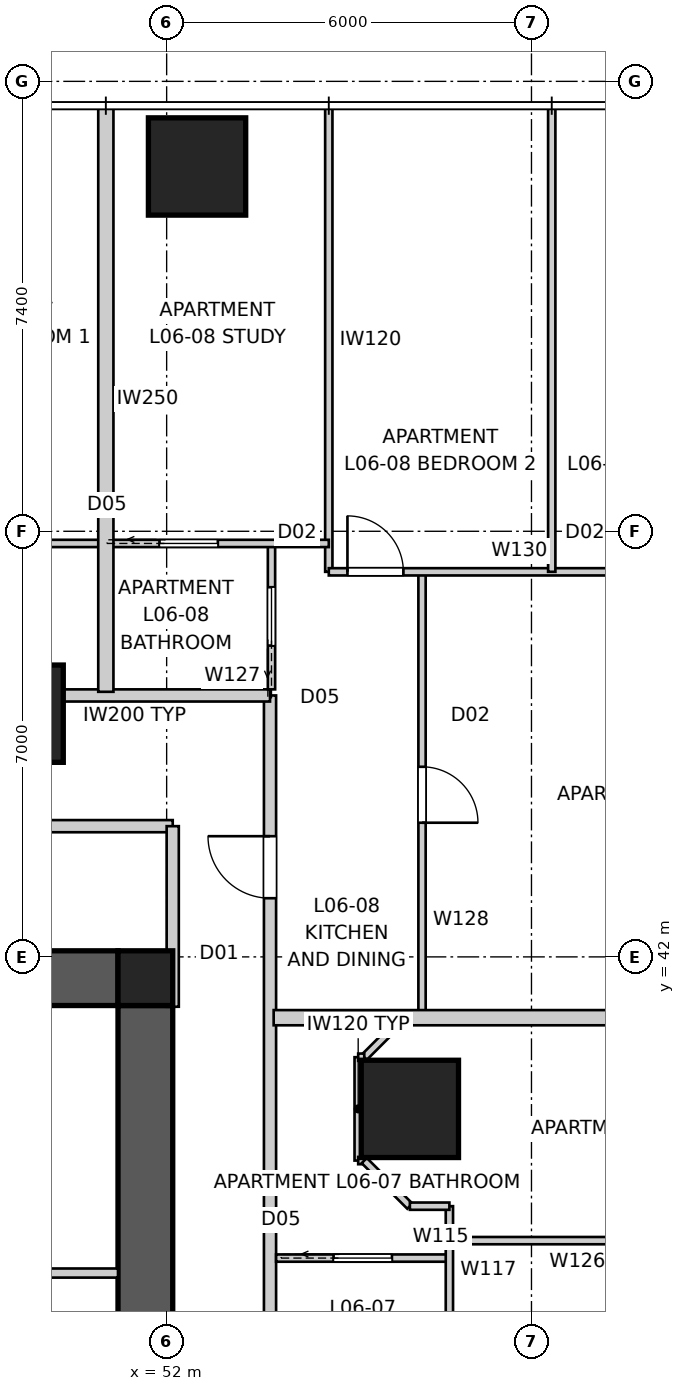
"""IFC4 building model, lengths in metres.
Left out: names, types, materials, properties, quantities, classifications, styles, units other than length and angle.
Written with IfcOpenShell. Run it as: python <this file> out.ifc"""

import sys

from ifc_helpers import new_model, si_unit, direction, frame, frame_2d, origin, origin_2d, place, context, subcontext, project, spatial, polyline, rectangle, outline, extrude, element, fill, save


model = new_model("IFC4")
c1 = context("Model", 3, precision=1e-05, world=origin(), true_north=direction((0.0, 1.0)))
c2 = subcontext(c1, "Body", "Model", "MODEL_VIEW")
j1 = project(units=[si_unit("LENGTHUNIT", "METRE"), si_unit("PLANEANGLEUNIT", "RADIAN")], contexts=[c1])
p1 = place(None, origin())
s1 = spatial("IfcSite", under=j1, at=p1, CompositionType="ELEMENT")
p2 = place(p1, origin())
s2 = spatial("IfcBuilding", under=s1, at=p2, CompositionType="ELEMENT")
p3 = place(p2, frame((0.0, 0.0, 25.2)))
s3 = spatial("IfcBuildingStorey", under=s2, at=p3, CompositionType="ELEMENT", Elevation=25.2)
p4 = place(p3, frame((28.8, 41.65, 0.0), z_axis=(0.0, 0.0, 1.0), x_axis=(1.0, 0.0, 0.0)))
e1 = element("IfcWall", 1, at=p4, inside=s3, PredefinedType="SHEAR", context=c2, shape_type="SweptSolid", body=[
    extrude(outline(polyline([(0.0, -0.45), (22.4, -0.45), (22.4, -0.025), (22.85, -0.025), (22.85, 0.025), (22.4, 0.025), (22.4, 0.45), (0.0, 0.45), (0.0, 0.025), (-0.45, 0.025), (-0.45, -0.025), (0.0, -0.025), (0.0, -0.45)])), origin(), (0.0, 0.0, 1.0), 3.4),
])
p5 = place(p3, frame((51.65, 18.8, 0.0), z_axis=(0.0, 0.0, 1.0), x_axis=(0.0, 1.0, 0.0)))
e2 = element("IfcWall", 2, at=p5, inside=s3, PredefinedType="SHEAR", context=c2, shape_type="SweptSolid", body=[
    extrude(outline(polyline([(0.0, -0.45), (22.4, -0.45), (22.4, -0.025), (22.85, -0.025), (22.85, 0.025), (22.4, 0.025), (22.4, 0.45), (0.0, 0.45), (0.0, 0.025), (-0.45, 0.025), (-0.45, -0.025), (0.0, -0.025), (0.0, -0.45)])), origin(), (0.0, 0.0, 1.0), 3.4),
])
p6 = place(p5, frame((11.14, 0.0, 0.0)))
e3 = element("IfcOpeningElement", 3, at=p6, cuts=e2, PredefinedType="OPENING", context=c2, shape_type="SweptSolid", body=[
    extrude(rectangle(XDim=1.02, YDim=2.4, at=frame_2d((0.51, 1.2))), frame((0.0, 0.46, 0.0), z_axis=(0.0, -1.0, 0.0), x_axis=(1.0, 0.0, 0.0)), (0.0, 0.0, 1.0), 0.92),
])
p7 = place(p3, frame((51.65, 41.65, 0.0), z_axis=(0.0, 0.0, 1.0), x_axis=(1.0, 0.0, 0.0)))
e4 = element("IfcColumn", 4, at=p7, inside=s3, PredefinedType="COLUMN", context=c2, shape_type="SweptSolid", body=[
    extrude(rectangle(XDim=0.9, YDim=0.9, at=origin_2d()), origin(), (0.0, 0.0, 1.0), 3.4),
])
for number, where, z_axis, x_axis in (
    (5, (52.5, 55.0, 0.0), (0.0, 0.0, 1.0), (1.0, 0.0, 0.0)),
    (6, (56.0, 39.5, 0.0), (0.0, 0.0, 1.0), (1.0, 0.0, 0.0)),
    (7, (49.5, 46.0, 0.0), (0.0, 0.0, 1.0), (1.0, 0.0, 0.0)),
):
    element("IfcColumn", number, at=place(p3, frame(where, z_axis=z_axis, x_axis=x_axis)), inside=s3, PredefinedType="COLUMN", context=c2, shape_type="SweptSolid", body=[
        extrude(rectangle(XDim=1.6, YDim=1.6, at=origin_2d()), origin(), (0.0, 0.0, 1.0), 3.4),
    ])
p8 = place(p3, frame((53.7, 13.7, 0.0), z_axis=(0.0, 0.0, 1.0), x_axis=(0.0, 1.0, 0.0)))
e8 = element("IfcWall", 8, at=p8, inside=s3, PredefinedType="PARTITIONING", context=c2, shape_type="SweptSolid", body=[
    extrude(rectangle(XDim=32.6, YDim=0.2, at=frame_2d((16.3, 0.0))), origin(), (0.0, 0.0, 1.0), 3.25),
])
p9 = place(p8, frame((2.315, 0.0, 0.0)))
e9 = element("IfcOpeningElement", 9, at=p9, cuts=e8, PredefinedType="OPENING", context=c2, shape_type="SweptSolid", body=[
    extrude(rectangle(XDim=1.02, YDim=2.34, at=frame_2d((0.51, 1.17))), frame((0.0, 0.11, 0.0), z_axis=(0.0, -1.0, 0.0), x_axis=(1.0, 0.0, 0.0)), (0.0, 0.0, 1.0), 0.22),
])
p10 = place(p8, frame((29.265, 0.0, 0.0)))
e10 = element("IfcOpeningElement", 10, at=p10, cuts=e8, PredefinedType="OPENING", context=c2, shape_type="SweptSolid", body=[
    extrude(rectangle(XDim=1.02, YDim=2.34, at=frame_2d((0.51, 1.17))), frame((0.0, 0.11, 0.0), z_axis=(0.0, -1.0, 0.0), x_axis=(1.0, 0.0, 0.0)), (0.0, 0.0, 1.0), 0.22),
])
p11 = place(p8, frame((20.646, 0.0, 0.0)))
e11 = element("IfcOpeningElement", 11, at=p11, cuts=e8, PredefinedType="OPENING", context=c2, shape_type="SweptSolid", body=[
    extrude(rectangle(XDim=1.02, YDim=2.34, at=frame_2d((0.51, 1.17))), frame((0.0, 0.11, 0.0), z_axis=(0.0, -1.0, 0.0), x_axis=(1.0, 0.0, 0.0)), (0.0, 0.0, 1.0), 0.22),
])
p12 = place(p8, frame((13.626, 0.0, 0.0)))
e12 = element("IfcOpeningElement", 12, at=p12, cuts=e8, PredefinedType="OPENING", context=c2, shape_type="SweptSolid", body=[
    extrude(rectangle(XDim=1.02, YDim=2.34, at=frame_2d((0.51, 1.17))), frame((0.0, 0.11, 0.0), z_axis=(0.0, -1.0, 0.0), x_axis=(1.0, 0.0, 0.0)), (0.0, 0.0, 1.0), 0.22),
])
p13 = place(p3, frame((53.7, 46.3, 0.0), z_axis=(0.0, 0.0, 1.0), x_axis=(-1.0, 0.0, 0.0)))
e13 = element("IfcWall", 13, at=p13, inside=s3, PredefinedType="PARTITIONING", context=c2, shape_type="SweptSolid", body=[
    extrude(rectangle(XDim=4.458, YDim=0.2, at=frame_2d((2.229, 0.0))), origin(), (0.0, 0.0, 1.0), 3.25),
])
p14 = place(p3, frame((66.0, 41.0, 0.0), z_axis=(0.0, 0.0, 1.0), x_axis=(-1.0, 0.0, 0.0)))
e14 = element("IfcWall", 14, at=p14, inside=s3, PredefinedType="PARTITIONING", context=c2, shape_type="SweptSolid", body=[
    extrude(rectangle(XDim=12.24, YDim=0.25, at=frame_2d((6.12, 0.0))), origin(), (0.0, 0.0, 1.0), 3.25),
])
p15 = place(p3, frame((51.0, 56.0, 0.0), z_axis=(0.0, 0.0, 1.0), x_axis=(0.0, -1.0, 0.0)))
e15 = element("IfcWall", 15, at=p15, inside=s3, PredefinedType="PARTITIONING", context=c2, shape_type="SweptSolid", body=[
    extrude(rectangle(XDim=9.64, YDim=0.25, at=frame_2d((4.82, 0.0))), origin(), (0.0, 0.0, 1.0), 3.25),
])
p16 = place(p3, frame((43.0, 36.8, 0.0), z_axis=(0.0, 0.0, 1.0), x_axis=(1.0, 0.0, 0.0)))
e16 = element("IfcWall", 16, at=p16, inside=s3, PredefinedType="SOLIDWALL", context=c2, shape_type="SweptSolid", body=[
    extrude(rectangle(XDim=8.2, YDim=0.15, at=frame_2d((4.1, 0.0))), origin(), (0.0, 0.0, 1.0), 3.25),
])
p17 = place(p16, frame((3.64, 0.0, 0.0)))
e17 = element("IfcOpeningElement", 17, at=p17, cuts=e16, PredefinedType="OPENING", context=c2, shape_type="SweptSolid", body=[
    extrude(rectangle(XDim=0.92, YDim=2.1, at=frame_2d((0.46, 1.05))), frame((0.0, 0.085, 0.0), z_axis=(0.0, -1.0, 0.0), x_axis=(1.0, 0.0, 0.0)), (0.0, 0.0, 1.0), 0.17),
])
p18 = place(p3, frame((52.1, 44.15, 0.0), z_axis=(0.0, 0.0, 1.0), x_axis=(-1.0, 0.0, 0.0)))
e18 = element("IfcWall", 18, at=p18, inside=s3, PredefinedType="PARTITIONING", context=c2, shape_type="SweptSolid", body=[
    extrude(rectangle(XDim=24.2, YDim=0.2, at=frame_2d((12.1, 0.0))), origin(), (0.0, 0.0, 1.0), 3.25),
])
p19 = place(p18, frame((10.743, 0.0, 0.0)))
e19 = element("IfcOpeningElement", 19, at=p19, cuts=e18, PredefinedType="OPENING", context=c2, shape_type="SweptSolid", body=[
    extrude(rectangle(XDim=1.02, YDim=2.1, at=frame_2d((0.51, 1.05))), frame((0.0, 0.11, 0.0), z_axis=(0.0, -1.0, 0.0), x_axis=(1.0, 0.0, 0.0)), (0.0, 0.0, 1.0), 0.22),
])
p20 = place(p18, frame((19.636, 0.0, 0.0)))
e20 = element("IfcOpeningElement", 20, at=p20, cuts=e18, PredefinedType="OPENING", context=c2, shape_type="SweptSolid", body=[
    extrude(rectangle(XDim=1.02, YDim=2.1, at=frame_2d((0.51, 1.05))), frame((0.0, 0.11, 0.0), z_axis=(0.0, -1.0, 0.0), x_axis=(1.0, 0.0, 0.0)), (0.0, 0.0, 1.0), 0.22),
])
p21 = place(p18, frame((3.447, 0.0, 0.0)))
e21 = element("IfcOpeningElement", 21, at=p21, cuts=e18, PredefinedType="OPENING", context=c2, shape_type="SweptSolid", body=[
    extrude(rectangle(XDim=1.02, YDim=2.1, at=frame_2d((0.51, 1.05))), frame((0.0, 0.11, 0.0), z_axis=(0.0, -1.0, 0.0), x_axis=(1.0, 0.0, 0.0)), (0.0, 0.0, 1.0), 0.22),
])
p22 = place(p3, frame((52.1, 41.18, 0.0), z_axis=(0.0, 0.0, 1.0), x_axis=(0.0, 1.0, 0.0)))
e22 = element("IfcWall", 22, at=p22, inside=s3, PredefinedType="PARTITIONING", context=c2, shape_type="SweptSolid", body=[
    extrude(rectangle(XDim=2.97, YDim=0.2, at=frame_2d((1.485, 0.0))), origin(), (0.0, 0.0, 1.0), 3.25),
])
p23 = place(p3, frame((53.8, 37.046, 0.0), z_axis=(0.0, 0.0, 1.0), x_axis=(1.0, 0.0, 0.0)))
e23 = element("IfcWall", 23, at=p23, inside=s3, PredefinedType="PARTITIONING", context=c2, shape_type="SweptSolid", body=[
    extrude(rectangle(XDim=2.85, YDim=0.12, at=frame_2d((1.425, 0.0))), origin(), (0.0, 0.0, 1.0), 3.25),
])
p24 = place(p23, frame((0.945, 0.0, 0.0)))
e24 = element("IfcOpeningElement", 24, at=p24, cuts=e23, PredefinedType="OPENING", context=c2, shape_type="SweptSolid", body=[
    extrude(rectangle(XDim=0.96, YDim=2.1, at=frame_2d((0.48, 1.05))), frame((0.0, 0.07, 0.0), z_axis=(0.0, -1.0, 0.0), x_axis=(1.0, 0.0, 0.0)), (0.0, 0.0, 1.0), 0.14),
])
p25 = place(p3, frame((56.65, 37.9, 0.0), z_axis=(0.0, 0.0, 1.0), x_axis=(0.0, -1.0, 0.0)))
e25 = element("IfcWall", 25, at=p25, inside=s3, PredefinedType="PARTITIONING", context=c2, shape_type="SweptSolid", body=[
    extrude(rectangle(XDim=5.234, YDim=0.12, at=frame_2d((2.617, 0.0))), origin(), (0.0, 0.0, 1.0), 2.55),
])
p26 = place(p25, frame((2.109, 0.0, 0.0)))
e26 = element("IfcOpeningElement", 26, at=p26, cuts=e25, PredefinedType="OPENING", context=c2, shape_type="SweptSolid", body=[
    extrude(rectangle(XDim=0.92, YDim=2.34, at=frame_2d((0.46, 1.17))), frame((0.0, 0.07, 0.0), z_axis=(0.0, -1.0, 0.0), x_axis=(1.0, 0.0, 0.0)), (0.0, 0.0, 1.0), 0.14),
])
p27 = place(p3, frame((55.9, 41.0, 0.0), z_axis=(0.0, 0.0, 1.0), x_axis=(-0.707106781187, -0.707106781187, 0.0)))
e27 = element("IfcWall", 27, at=p27, inside=s3, PredefinedType="PARTITIONING", context=c2, shape_type="SweptSolid", body=[
    extrude(rectangle(XDim=0.919, YDim=0.12, at=frame_2d((0.459, 0.0))), origin(), (0.0, 0.0, 1.0), 3.25),
])
p28 = place(p3, frame((55.15, 40.35, 0.0), z_axis=(0.0, 0.0, 1.0), x_axis=(0.0, -1.0, 0.0)))
e28 = element("IfcWall", 28, at=p28, inside=s3, PredefinedType="PARTITIONING", context=c2, shape_type="SweptSolid", body=[
    extrude(rectangle(XDim=1.7, YDim=0.12, at=frame_2d((0.85, 0.0))), origin(), (0.0, 0.0, 1.0), 3.25),
])
p29 = place(p3, frame((55.25, 38.65, 0.0), z_axis=(0.0, 0.0, 1.0), x_axis=(0.707106781187, -0.707106781187, 0.0)))
e29 = element("IfcWall", 29, at=p29, inside=s3, PredefinedType="PARTITIONING", context=c2, shape_type="SweptSolid", body=[
    extrude(rectangle(XDim=1.061, YDim=0.12, at=frame_2d((0.53, 0.0))), origin(), (0.0, 0.0, 1.0), 3.25),
])
p30 = place(p3, frame((56.0, 37.9, 0.0), z_axis=(0.0, 0.0, 1.0), x_axis=(1.0, 0.0, 0.0)))
e30 = element("IfcWall", 30, at=p30, inside=s3, PredefinedType="PARTITIONING", context=c2, shape_type="SweptSolid", body=[
    extrude(rectangle(XDim=0.65, YDim=0.12, at=frame_2d((0.325, 0.0))), origin(), (0.0, 0.0, 1.0), 3.25),
])
p31 = place(p3, frame((65.96, 37.333, 0.0), z_axis=(0.0, 0.0, 1.0), x_axis=(-1.0, 0.0, 0.0)))
e31 = element("IfcWall", 31, at=p31, inside=s3, PredefinedType="PARTITIONING", context=c2, shape_type="SweptSolid", body=[
    extrude(rectangle(XDim=9.31, YDim=0.12, at=frame_2d((4.655, 0.0))), origin(), (0.0, 0.0, 1.0), 3.25),
])
p32 = place(p31, frame((4.175, 0.0, 0.0)))
e32 = element("IfcOpeningElement", 32, at=p32, cuts=e31, PredefinedType="OPENING", context=c2, shape_type="SweptSolid", body=[
    extrude(rectangle(XDim=0.92, YDim=2.34, at=frame_2d((0.46, 1.17))), frame((0.0, 0.07, 0.0), z_axis=(0.0, -1.0, 0.0), x_axis=(1.0, 0.0, 0.0)), (0.0, 0.0, 1.0), 0.14),
])
p33 = place(p3, frame((53.724, 46.4, 0.0), z_axis=(0.0, 0.0, 1.0), x_axis=(0.0, 1.0, 0.0)))
e33 = element("IfcWall", 33, at=p33, inside=s3, PredefinedType="PARTITIONING", context=c2, shape_type="SweptSolid", body=[
    extrude(rectangle(XDim=2.4, YDim=0.12, at=frame_2d((1.2, 0.0))), origin(), (0.0, 0.0, 1.0), 3.25),
])
p34 = place(p33, frame((0.72, 0.0, 0.0)))
e34 = element("IfcOpeningElement", 34, at=p34, cuts=e33, PredefinedType="OPENING", context=c2, shape_type="SweptSolid", body=[
    extrude(rectangle(XDim=0.96, YDim=2.1, at=frame_2d((0.48, 1.05))), frame((0.0, 0.07, 0.0), z_axis=(0.0, -1.0, 0.0), x_axis=(1.0, 0.0, 0.0)), (0.0, 0.0, 1.0), 0.14),
])
p35 = place(p3, frame((56.2, 48.333, 0.0), z_axis=(0.0, 0.0, 1.0), x_axis=(0.0, -1.0, 0.0)))
e35 = element("IfcWall", 35, at=p35, inside=s3, PredefinedType="PARTITIONING", context=c2, shape_type="SweptSolid", body=[
    extrude(rectangle(XDim=7.333, YDim=0.12, at=frame_2d((3.667, 0.0))), origin(), (0.0, 0.0, 1.0), 3.25),
])
p36 = place(p35, frame((3.207, 0.0, 0.0)))
e36 = element("IfcOpeningElement", 36, at=p36, cuts=e35, PredefinedType="OPENING", context=c2, shape_type="SweptSolid", body=[
    extrude(rectangle(XDim=0.92, YDim=2.34, at=frame_2d((0.46, 1.17))), frame((0.0, 0.07, 0.0), z_axis=(0.0, -1.0, 0.0), x_axis=(1.0, 0.0, 0.0)), (0.0, 0.0, 1.0), 0.14),
])
p37 = place(p3, frame((54.667, 55.96, 0.0), z_axis=(0.0, 0.0, 1.0), x_axis=(0.0, -1.0, 0.0)))
e37 = element("IfcWall", 37, at=p37, inside=s3, PredefinedType="PARTITIONING", context=c2, shape_type="SweptSolid", body=[
    extrude(rectangle(XDim=7.627, YDim=0.12, at=frame_2d((3.813, 0.0))), origin(), (0.0, 0.0, 1.0), 2.637),
])
p38 = place(p3, frame((54.667, 48.333, 0.0), z_axis=(0.0, 0.0, 1.0), x_axis=(1.0, 0.0, 0.0)))
e38 = element("IfcWall", 38, at=p38, inside=s3, PredefinedType="PARTITIONING", context=c2, shape_type="SweptSolid", body=[
    extrude(rectangle(XDim=11.293, YDim=0.12, at=frame_2d((5.646, 0.0))), origin(), (0.0, 0.0, 1.0), 3.25),
])
p39 = place(p38, frame((0.307, 0.0, 0.0)))
e39 = element("IfcOpeningElement", 39, at=p39, cuts=e38, PredefinedType="OPENING", context=c2, shape_type="SweptSolid", body=[
    extrude(rectangle(XDim=0.92, YDim=2.34, at=frame_2d((0.46, 1.17))), frame((0.0, 0.07, 0.0), z_axis=(0.0, -1.0, 0.0), x_axis=(1.0, 0.0, 0.0)), (0.0, 0.0, 1.0), 0.14),
])
p40 = place(p38, frame((8.848, 0.0, 0.0)))
e40 = element("IfcOpeningElement", 40, at=p40, cuts=e38, PredefinedType="OPENING", context=c2, shape_type="SweptSolid", body=[
    extrude(rectangle(XDim=0.92, YDim=2.34, at=frame_2d((0.46, 1.17))), frame((0.0, 0.07, 0.0), z_axis=(0.0, -1.0, 0.0), x_axis=(1.0, 0.0, 0.0)), (0.0, 0.0, 1.0), 0.14),
])
p41 = place(p38, frame((5.04, 0.0, 0.0)))
e41 = element("IfcOpeningElement", 41, at=p41, cuts=e38, PredefinedType="OPENING", context=c2, shape_type="SweptSolid", body=[
    extrude(rectangle(XDim=0.92, YDim=2.34, at=frame_2d((0.46, 1.17))), frame((0.0, 0.07, 0.0), z_axis=(0.0, -1.0, 0.0), x_axis=(1.0, 0.0, 0.0)), (0.0, 0.0, 1.0), 0.14),
])
p42 = place(p3, frame((25.333, 48.8, 0.0), z_axis=(0.0, 0.0, 1.0), x_axis=(1.0, 0.0, 0.0)))
e42 = element("IfcWall", 42, at=p42, inside=s3, PredefinedType="PARTITIONING", context=c2, shape_type="SweptSolid", body=[
    extrude(rectangle(XDim=29.333, YDim=0.12, at=frame_2d((14.667, 0.0))), origin(), (0.0, 0.0, 1.0), 3.25),
])
p43 = place(p42, frame((19.707, 0.0, 0.0)))
e43 = element("IfcOpeningElement", 43, at=p43, cuts=e42, PredefinedType="OPENING", context=c2, shape_type="SweptSolid", body=[
    extrude(rectangle(XDim=0.92, YDim=2.34, at=frame_2d((0.46, 1.17))), frame((0.0, 0.07, 0.0), z_axis=(0.0, -1.0, 0.0), x_axis=(1.0, 0.0, 0.0)), (0.0, 0.0, 1.0), 0.14),
])
p44 = place(p42, frame((23.348, 0.0, 0.0)))
e44 = element("IfcOpeningElement", 44, at=p44, cuts=e42, PredefinedType="OPENING", context=c2, shape_type="SweptSolid", body=[
    extrude(rectangle(XDim=0.92, YDim=2.34, at=frame_2d((0.46, 1.17))), frame((0.0, 0.07, 0.0), z_axis=(0.0, -1.0, 0.0), x_axis=(1.0, 0.0, 0.0)), (0.0, 0.0, 1.0), 0.14),
])
p45 = place(p42, frame((16.884, 0.0, 0.0)))
e45 = element("IfcOpeningElement", 45, at=p45, cuts=e42, PredefinedType="OPENING", context=c2, shape_type="SweptSolid", body=[
    extrude(rectangle(XDim=0.92, YDim=2.34, at=frame_2d((0.46, 1.17))), frame((0.0, 0.07, 0.0), z_axis=(0.0, -1.0, 0.0), x_axis=(1.0, 0.0, 0.0)), (0.0, 0.0, 1.0), 0.14),
])
p46 = place(p42, frame((26.549, 0.0, 0.0)))
e46 = element("IfcOpeningElement", 46, at=p46, cuts=e42, PredefinedType="OPENING", context=c2, shape_type="SweptSolid", body=[
    extrude(rectangle(XDim=0.96, YDim=2.1, at=frame_2d((0.48, 1.05))), frame((0.0, 0.07, 0.0), z_axis=(0.0, -1.0, 0.0), x_axis=(1.0, 0.0, 0.0)), (0.0, 0.0, 1.0), 0.14),
])
p47 = place(p42, frame((1.844, 0.0, 0.0)))
e47 = element("IfcOpeningElement", 47, at=p47, cuts=e42, PredefinedType="OPENING", context=c2, shape_type="SweptSolid", body=[
    extrude(rectangle(XDim=0.96, YDim=2.1, at=frame_2d((0.48, 1.05))), frame((0.0, 0.07, 0.0), z_axis=(0.0, -1.0, 0.0), x_axis=(1.0, 0.0, 0.0)), (0.0, 0.0, 1.0), 0.14),
])
p48 = place(p42, frame((8.484, 0.0, 0.0)))
e48 = element("IfcOpeningElement", 48, at=p48, cuts=e42, PredefinedType="OPENING", context=c2, shape_type="SweptSolid", body=[
    extrude(rectangle(XDim=0.96, YDim=2.1, at=frame_2d((0.48, 1.05))), frame((0.0, 0.07, 0.0), z_axis=(0.0, -1.0, 0.0), x_axis=(1.0, 0.0, 0.0)), (0.0, 0.0, 1.0), 0.14),
])
p49 = place(p3, frame((58.333, 48.333, 0.0), z_axis=(0.0, 0.0, 1.0), x_axis=(0.0, 1.0, 0.0)))
e49 = element("IfcWall", 49, at=p49, inside=s3, PredefinedType="PARTITIONING", context=c2, shape_type="SweptSolid", body=[
    extrude(rectangle(XDim=7.627, YDim=0.12, at=frame_2d((3.813, 0.0))), origin(), (0.0, 0.0, 1.0), 3.25),
])
for number, where, z_axis, x_axis in (
    (50, (55.15, 40.35, 0.0), (0.0, 0.0, 1.0), (1.0, 0.0, 0.0)),
    (51, (55.15, 38.65, 0.0), (0.0, 0.0, 1.0), (1.0, 0.0, 0.0)),
):
    element("IfcWall", number, at=place(p3, frame(where, z_axis=z_axis, x_axis=x_axis)), inside=s3, PredefinedType="PARTITIONING", context=c2, shape_type="SweptSolid", body=[
        extrude(rectangle(XDim=0.1, YDim=0.12, at=frame_2d((0.05, 0.0))), origin(), (0.0, 0.0, 1.0), 3.25),
    ])
p50 = place(p10, origin())
e52 = element("IfcDoor", 52, at=p50, inside=s3, OperationType="SINGLE_SWING_RIGHT", PredefinedType="DOOR", context=c2, shape_type="SweptSolid", body=[
    extrude(rectangle(XDim=1.02, YDim=2.34, at=frame_2d((0.51, 1.17))), frame((0.0, 0.025, 0.0), z_axis=(0.0, -1.0, 0.0), x_axis=(1.0, 0.0, 0.0)), (0.0, 0.0, 1.0), 0.05),
])
fill(e10, e52)
p51 = place(p36, origin())
e53 = element("IfcDoor", 53, at=p51, inside=s3, OperationType="SINGLE_SWING_RIGHT", PredefinedType="DOOR", context=c2, shape_type="SweptSolid", body=[
    extrude(rectangle(XDim=0.92, YDim=2.34, at=frame_2d((0.46, 1.17))), frame((0.0, 0.025, 0.0), z_axis=(0.0, -1.0, 0.0), x_axis=(1.0, 0.0, 0.0)), (0.0, 0.0, 1.0), 0.05),
])
fill(e36, e53)
p52 = place(p34, origin())
e54 = element("IfcDoor", 54, at=p52, inside=s3, OperationType="SLIDING_TO_LEFT", PredefinedType="DOOR", context=c2, shape_type="SweptSolid", body=[
    extrude(rectangle(XDim=0.96, YDim=2.1, at=frame_2d((0.48, 1.05))), frame((0.0, 0.025, 0.0), z_axis=(0.0, -1.0, 0.0), x_axis=(1.0, 0.0, 0.0)), (0.0, 0.0, 1.0), 0.05),
])
fill(e34, e54)
p53 = place(p39, origin())
e55 = element("IfcDoor", 55, at=p53, inside=s3, OperationType="SINGLE_SWING_LEFT", PredefinedType="DOOR", context=c2, shape_type="SweptSolid", body=[
    extrude(rectangle(XDim=0.92, YDim=2.34, at=frame_2d((0.46, 1.17))), frame((0.0, 0.025, 0.0), z_axis=(0.0, -1.0, 0.0), x_axis=(1.0, 0.0, 0.0)), (0.0, 0.0, 1.0), 0.05),
])
fill(e39, e55)
p54 = place(p24, origin())
e56 = element("IfcDoor", 56, at=p54, inside=s3, OperationType="SLIDING_TO_LEFT", PredefinedType="DOOR", context=c2, shape_type="SweptSolid", body=[
    extrude(rectangle(XDim=0.96, YDim=2.1, at=frame_2d((0.48, 1.05))), frame((0.0, 0.025, 0.0), z_axis=(0.0, -1.0, 0.0), x_axis=(1.0, 0.0, 0.0)), (0.0, 0.0, 1.0), 0.05),
])
fill(e24, e56)
p55 = place(p46, origin())
e57 = element("IfcDoor", 57, at=p55, inside=s3, OperationType="SLIDING_TO_LEFT", PredefinedType="DOOR", context=c2, shape_type="SweptSolid", body=[
    extrude(rectangle(XDim=0.96, YDim=2.1, at=frame_2d((0.48, 1.05))), frame((0.0, 0.025, 0.0), z_axis=(0.0, -1.0, 0.0), x_axis=(1.0, 0.0, 0.0)), (0.0, 0.0, 1.0), 0.05),
])
fill(e46, e57)
save(model, sys.argv[1])
